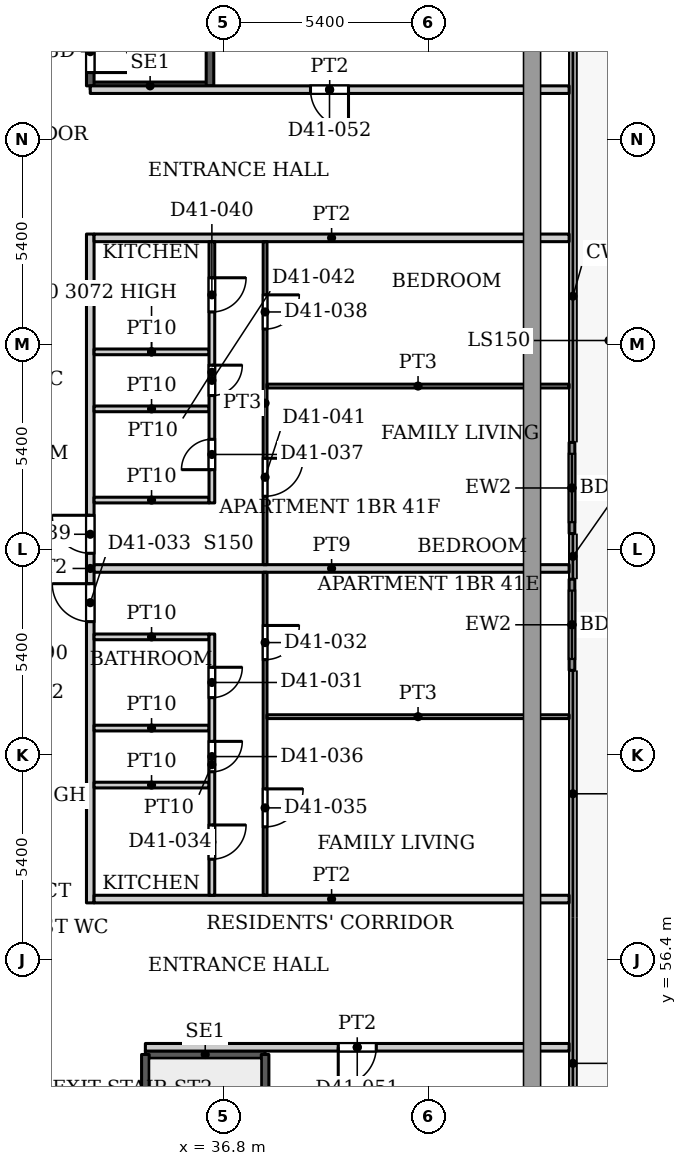
"""IFC4 building model, lengths in metres.
Left out: names, types, materials, properties, quantities, classifications, styles, units other than length and angle.
Written with IfcOpenShell. Run it as: python <this file> out.ifc"""

import sys

from ifc_helpers import new_model, si_unit, direction, frame, frame_2d, origin, place, context, subcontext, project, spatial, rectangle, extrude, source, transform, mapped, element, fill, save


model = new_model("IFC4")
c1 = context("Model", 3, precision=1e-05, world=origin(), true_north=direction((0.0, 1.0)))
c2 = subcontext(c1, "Body", "Model", "MODEL_VIEW")
j1 = project(units=[si_unit("LENGTHUNIT", "METRE"), si_unit("PLANEANGLEUNIT", "RADIAN")], contexts=[c1])
p1 = place(None, origin())
s1 = spatial("IfcSite", under=j1, at=p1, CompositionType="ELEMENT")
p2 = place(p1, origin())
s2 = spatial("IfcBuilding", under=s1, at=p2, CompositionType="ELEMENT")
p3 = place(p2, frame((0.0, 0.0, 176.0)))
s3 = spatial("IfcBuildingStorey", under=s2, at=p3, CompositionType="ELEMENT", Elevation=176.0)
p4 = place(p3, frame((45.975, 70.018, 0.0), z_axis=(0.0, 0.0, 1.0), x_axis=(0.0, -1.0, 0.0)))
e1 = element("IfcWall", 1, at=p4, inside=s3, PredefinedType="SOLIDWALL", context=c2, shape_type="SweptSolid", body=[
    extrude(rectangle(XDim=2.4, YDim=0.15, at=frame_2d((1.2, 0.0))), origin(), (0.0, 0.0, 1.0), 3.75),
])
p5 = place(p4, frame((0.3, 0.0, 0.0)))
e2 = element("IfcOpeningElement", 2, at=p5, cuts=e1, PredefinedType="OPENING", context=c2, shape_type="SweptSolid", body=[
    extrude(rectangle(XDim=1.8, YDim=2.4, at=frame_2d((0.9, 1.2))), frame((0.0, 0.085, 0.0), z_axis=(0.0, -1.0, 0.0), x_axis=(1.0, 0.0, 0.0)), (0.0, 0.0, 1.0), 0.17),
])
p6 = place(p3, frame((45.975, 66.418, 0.0), z_axis=(0.0, 0.0, 1.0), x_axis=(0.0, -1.0, 0.0)))
e3 = element("IfcWall", 3, at=p6, inside=s3, PredefinedType="SOLIDWALL", context=c2, shape_type="SweptSolid", body=[
    extrude(rectangle(XDim=2.4, YDim=0.15, at=frame_2d((1.2, 0.0))), origin(), (0.0, 0.0, 1.0), 3.75),
])
p7 = place(p6, frame((0.3, 0.0, 0.0)))
e4 = element("IfcOpeningElement", 4, at=p7, cuts=e3, PredefinedType="OPENING", context=c2, shape_type="SweptSolid", body=[
    extrude(rectangle(XDim=1.8, YDim=2.4, at=frame_2d((0.9, 1.2))), frame((0.0, 0.085, 0.0), z_axis=(0.0, -1.0, 0.0), x_axis=(1.0, 0.0, 0.0)), (0.0, 0.0, 1.0), 0.17),
])
p8 = place(p3, frame((34.75, 53.91, 0.0), z_axis=(0.0, 0.0, 1.0), x_axis=(1.0, 0.0, 0.0)))
e5 = element("IfcWall", 5, at=p8, inside=s3, PredefinedType="SHEAR", context=c2, shape_type="SweptSolid", body=[
    extrude(rectangle(XDim=3.15, YDim=0.2, at=frame_2d((1.575, 0.0))), origin(), (0.0, 0.0, 1.0), 3.9),
])
p9 = place(p3, frame((34.75, 47.5, 0.0), z_axis=(0.0, 0.0, 1.0), x_axis=(0.0, 1.0, 0.0)))
e6 = element("IfcWall", 6, at=p9, inside=s3, PredefinedType="SHEAR", context=c2, shape_type="SweptSolid", body=[
    extrude(rectangle(XDim=6.41, YDim=0.2, at=frame_2d((3.205, 0.0))), origin(), (0.0, 0.0, 1.0), 3.9),
])
p10 = place(p3, frame((37.9, 44.75, 0.0), z_axis=(0.0, 0.0, 1.0), x_axis=(0.0, 1.0, 0.0)))
e7 = element("IfcWall", 7, at=p10, inside=s3, PredefinedType="SHEAR", context=c2, shape_type="SweptSolid", body=[
    extrude(rectangle(XDim=9.16, YDim=0.2, at=frame_2d((4.58, 0.0))), origin(), (0.0, 0.0, 1.0), 3.9),
])
p11 = place(p3, frame((33.3, 79.4, 0.0), z_axis=(0.0, 0.0, 1.0), x_axis=(1.0, 0.0, 0.0)))
e8 = element("IfcWall", 8, at=p11, inside=s3, PredefinedType="SHEAR", context=c2, shape_type="SweptSolid", body=[
    extrude(rectangle(XDim=3.15, YDim=0.2, at=frame_2d((1.575, 0.0))), origin(), (0.0, 0.0, 1.0), 3.9),
])
p12 = place(p3, frame((33.3, 79.4, 0.0), z_axis=(0.0, 0.0, 1.0), x_axis=(0.0, 1.0, 0.0)))
e9 = element("IfcWall", 9, at=p12, inside=s3, PredefinedType="SHEAR", context=c2, shape_type="SweptSolid", body=[
    extrude(rectangle(XDim=9.16, YDim=0.2, at=frame_2d((4.58, 0.0))), origin(), (0.0, 0.0, 1.0), 3.9),
])
p13 = place(p12, frame((0.35, 0.0, 0.0)))
e10 = element("IfcOpeningElement", 10, at=p13, cuts=e9, PredefinedType="OPENING", context=c2, shape_type="SweptSolid", body=[
    extrude(rectangle(XDim=1.1, YDim=2.2, at=frame_2d((0.55, 1.1))), frame((0.0, 0.11, 0.0), z_axis=(0.0, -1.0, 0.0), x_axis=(1.0, 0.0, 0.0)), (0.0, 0.0, 1.0), 0.22),
])
p14 = place(p3, frame((36.45, 79.4, 0.0), z_axis=(0.0, 0.0, 1.0), x_axis=(0.0, 1.0, 0.0)))
e11 = element("IfcWall", 11, at=p14, inside=s3, PredefinedType="SHEAR", context=c2, shape_type="SweptSolid", body=[
    extrude(rectangle(XDim=9.16, YDim=0.2, at=frame_2d((4.58, 0.0))), origin(), (0.0, 0.0, 1.0), 3.9),
])
p15 = place(p3, frame((33.3, 57.9, 0.0), z_axis=(0.0, 0.0, 1.0), x_axis=(0.0, 1.0, 0.0)))
e12 = element("IfcWall", 12, at=p15, inside=s3, PredefinedType="PARTITIONING", context=c2, shape_type="SweptSolid", body=[
    extrude(rectangle(XDim=17.6, YDim=0.2, at=frame_2d((8.8, 0.0))), origin(), (0.0, 0.0, 1.0), 3.6),
])
p16 = place(p15, frame((7.4, 0.0, 0.0)))
e13 = element("IfcOpeningElement", 13, at=p16, cuts=e12, PredefinedType="OPENING", context=c2, shape_type="SweptSolid", body=[
    extrude(rectangle(XDim=1.0, YDim=2.1, at=frame_2d((0.5, 1.05))), frame((0.0, 0.11, 0.0), z_axis=(0.0, -1.0, 0.0), x_axis=(1.0, 0.0, 0.0)), (0.0, 0.0, 1.0), 0.22),
])
p17 = place(p15, frame((9.2, 0.0, 0.0)))
e14 = element("IfcOpeningElement", 14, at=p17, cuts=e12, PredefinedType="OPENING", context=c2, shape_type="SweptSolid", body=[
    extrude(rectangle(XDim=1.0, YDim=2.1, at=frame_2d((0.5, 1.05))), frame((0.0, 0.11, 0.0), z_axis=(0.0, -1.0, 0.0), x_axis=(1.0, 0.0, 0.0)), (0.0, 0.0, 1.0), 0.22),
])
p18 = place(p3, frame((33.3, 79.3, 0.0), z_axis=(0.0, 0.0, 1.0), x_axis=(1.0, 0.0, 0.0)))
e15 = element("IfcWall", 15, at=p18, inside=s3, PredefinedType="PARTITIONING", context=c2, shape_type="SweptSolid", body=[
    extrude(rectangle(XDim=12.6, YDim=0.2, at=frame_2d((6.3, 0.0))), origin(), (0.0, 0.0, 1.0), 3.6),
])
p19 = place(p18, frame((5.795, 0.0, 0.0)))
e16 = element("IfcOpeningElement", 16, at=p19, cuts=e15, PredefinedType="OPENING", context=c2, shape_type="SweptSolid", body=[
    extrude(rectangle(XDim=1.0, YDim=2.1, at=frame_2d((0.5, 1.05))), frame((0.0, 0.11, 0.0), z_axis=(0.0, -1.0, 0.0), x_axis=(1.0, 0.0, 0.0)), (0.0, 0.0, 1.0), 0.22),
])
p20 = place(p3, frame((33.4, 58.0, 0.0), z_axis=(0.0, 0.0, 1.0), x_axis=(1.0, 0.0, 0.0)))
e17 = element("IfcWall", 17, at=p20, inside=s3, PredefinedType="PARTITIONING", context=c2, shape_type="SweptSolid", body=[
    extrude(rectangle(XDim=12.5, YDim=0.2, at=frame_2d((6.25, 0.0))), origin(), (0.0, 0.0, 1.0), 3.6),
])
for number, where, z_axis, x_axis in (
    (18, (33.4, 61.0, 0.0), (0.0, 0.0, 1.0), (1.0, 0.0, 0.0)),
    (19, (33.4, 62.5, 0.0), (0.0, 0.0, 1.0), (1.0, 0.0, 0.0)),
    (20, (33.4, 64.9, 0.0), (0.0, 0.0, 1.0), (1.0, 0.0, 0.0)),
):
    element("IfcWall", number, at=place(p3, frame(where, z_axis=z_axis, x_axis=x_axis)), inside=s3, PredefinedType="PARTITIONING", context=c2, shape_type="SweptSolid", body=[
        extrude(rectangle(XDim=3.025, YDim=0.15, at=frame_2d((1.513, 0.0))), origin(), (0.0, 0.0, 1.0), 3.6),
    ])
p21 = place(p3, frame((33.4, 66.7, 0.0), z_axis=(0.0, 0.0, 1.0), x_axis=(1.0, 0.0, 0.0)))
e21 = element("IfcWall", 21, at=p21, inside=s3, PredefinedType="PARTITIONING", context=c2, shape_type="SweptSolid", body=[
    extrude(rectangle(XDim=12.5, YDim=0.2, at=frame_2d((6.25, 0.0))), origin(), (0.0, 0.0, 1.0), 3.6),
])
for number, where, z_axis, x_axis in (
    (22, (33.4, 68.5, 0.0), (0.0, 0.0, 1.0), (1.0, 0.0, 0.0)),
    (23, (33.4, 70.9, 0.0), (0.0, 0.0, 1.0), (1.0, 0.0, 0.0)),
):
    element("IfcWall", number, at=place(p3, frame(where, z_axis=z_axis, x_axis=x_axis)), inside=s3, PredefinedType="PARTITIONING", context=c2, shape_type="SweptSolid", body=[
        extrude(rectangle(XDim=3.025, YDim=0.15, at=frame_2d((1.513, 0.0))), origin(), (0.0, 0.0, 1.0), 3.6),
    ])
p22 = place(p3, frame((33.4, 72.4, 0.0), z_axis=(0.0, 0.0, 1.0), x_axis=(1.0, 0.0, 0.0)))
e24 = element("IfcWall", 24, at=p22, inside=s3, PredefinedType="PARTITIONING", context=c2, shape_type="SweptSolid", body=[
    extrude(rectangle(XDim=3.025, YDim=0.15, at=frame_2d((1.513, 0.0))), origin(), (0.0, 0.0, 1.0), 3.072),
])
p23 = place(p3, frame((33.4, 75.4, 0.0), z_axis=(0.0, 0.0, 1.0), x_axis=(1.0, 0.0, 0.0)))
e25 = element("IfcWall", 25, at=p23, inside=s3, PredefinedType="PARTITIONING", context=c2, shape_type="SweptSolid", body=[
    extrude(rectangle(XDim=12.5, YDim=0.2, at=frame_2d((6.25, 0.0))), origin(), (0.0, 0.0, 1.0), 3.6),
])
p24 = place(p3, frame((34.75, 54.1, 0.0), z_axis=(0.0, 0.0, 1.0), x_axis=(1.0, 0.0, 0.0)))
e26 = element("IfcWall", 26, at=p24, inside=s3, PredefinedType="PARTITIONING", context=c2, shape_type="SweptSolid", body=[
    extrude(rectangle(XDim=11.15, YDim=0.2, at=frame_2d((5.575, 0.0))), origin(), (0.0, 0.0, 1.0), 3.6),
])
p25 = place(p24, frame((5.075, 0.0, 0.0)))
e27 = element("IfcOpeningElement", 27, at=p25, cuts=e26, PredefinedType="OPENING", context=c2, shape_type="SweptSolid", body=[
    extrude(rectangle(XDim=1.0, YDim=2.1, at=frame_2d((0.5, 1.05))), frame((0.0, 0.11, 0.0), z_axis=(0.0, -1.0, 0.0), x_axis=(1.0, 0.0, 0.0)), (0.0, 0.0, 1.0), 0.22),
])
p26 = place(p3, frame((36.5, 58.1, 0.0), z_axis=(0.0, 0.0, 1.0), x_axis=(0.0, 1.0, 0.0)))
e28 = element("IfcWall", 28, at=p26, inside=s3, PredefinedType="PARTITIONING", context=c2, shape_type="SweptSolid", body=[
    extrude(rectangle(XDim=6.875, YDim=0.15, at=frame_2d((3.438, 0.0))), origin(), (0.0, 0.0, 1.0), 3.6),
])
p27 = place(p26, frame((5.2, 0.0, 0.0)))
e29 = element("IfcOpeningElement", 29, at=p27, cuts=e28, PredefinedType="OPENING", context=c2, shape_type="SweptSolid", body=[
    extrude(rectangle(XDim=0.8, YDim=2.1, at=frame_2d((0.4, 1.05))), frame((0.0, 0.085, 0.0), z_axis=(0.0, -1.0, 0.0), x_axis=(1.0, 0.0, 0.0)), (0.0, 0.0, 1.0), 0.17),
])
p28 = place(p26, frame((0.95, 0.0, 0.0)))
e30 = element("IfcOpeningElement", 30, at=p28, cuts=e28, PredefinedType="OPENING", context=c2, shape_type="SweptSolid", body=[
    extrude(rectangle(XDim=0.9, YDim=2.1, at=frame_2d((0.45, 1.05))), frame((0.0, 0.085, 0.0), z_axis=(0.0, -1.0, 0.0), x_axis=(1.0, 0.0, 0.0)), (0.0, 0.0, 1.0), 0.17),
])
p29 = place(p26, frame((3.25, 0.0, 0.0)))
e31 = element("IfcOpeningElement", 31, at=p29, cuts=e28, PredefinedType="OPENING", context=c2, shape_type="SweptSolid", body=[
    extrude(rectangle(XDim=0.8, YDim=2.1, at=frame_2d((0.4, 1.05))), frame((0.0, 0.085, 0.0), z_axis=(0.0, -1.0, 0.0), x_axis=(1.0, 0.0, 0.0)), (0.0, 0.0, 1.0), 0.17),
])
p30 = place(p3, frame((36.5, 68.425, 0.0), z_axis=(0.0, 0.0, 1.0), x_axis=(0.0, 1.0, 0.0)))
e32 = element("IfcWall", 32, at=p30, inside=s3, PredefinedType="PARTITIONING", context=c2, shape_type="SweptSolid", body=[
    extrude(rectangle(XDim=6.875, YDim=0.15, at=frame_2d((3.438, 0.0))), origin(), (0.0, 0.0, 1.0), 3.6),
])
p31 = place(p30, frame((0.875, 0.0, 0.0)))
e33 = element("IfcOpeningElement", 33, at=p31, cuts=e32, PredefinedType="OPENING", context=c2, shape_type="SweptSolid", body=[
    extrude(rectangle(XDim=0.8, YDim=2.1, at=frame_2d((0.4, 1.05))), frame((0.0, 0.085, 0.0), z_axis=(0.0, -1.0, 0.0), x_axis=(1.0, 0.0, 0.0)), (0.0, 0.0, 1.0), 0.17),
])
p32 = place(p30, frame((5.025, 0.0, 0.0)))
e34 = element("IfcOpeningElement", 34, at=p32, cuts=e32, PredefinedType="OPENING", context=c2, shape_type="SweptSolid", body=[
    extrude(rectangle(XDim=0.9, YDim=2.1, at=frame_2d((0.45, 1.05))), frame((0.0, 0.085, 0.0), z_axis=(0.0, -1.0, 0.0), x_axis=(1.0, 0.0, 0.0)), (0.0, 0.0, 1.0), 0.17),
])
p33 = place(p30, frame((2.825, 0.0, 0.0)))
e35 = element("IfcOpeningElement", 35, at=p33, cuts=e32, PredefinedType="OPENING", context=c2, shape_type="SweptSolid", body=[
    extrude(rectangle(XDim=0.8, YDim=2.1, at=frame_2d((0.4, 1.05))), frame((0.0, 0.085, 0.0), z_axis=(0.0, -1.0, 0.0), x_axis=(1.0, 0.0, 0.0)), (0.0, 0.0, 1.0), 0.17),
])
p34 = place(p3, frame((37.9, 58.1, 0.0), z_axis=(0.0, 0.0, 1.0), x_axis=(0.0, 1.0, 0.0)))
e36 = element("IfcWall", 36, at=p34, inside=s3, PredefinedType="PARTITIONING", context=c2, shape_type="SweptSolid", body=[
    extrude(rectangle(XDim=8.5, YDim=0.1, at=frame_2d((4.25, 0.0))), origin(), (0.0, 0.0, 1.0), 3.6),
])
p35 = place(p34, frame((6.2, 0.0, 0.0)))
e37 = element("IfcOpeningElement", 37, at=p35, cuts=e36, PredefinedType="OPENING", context=c2, shape_type="SweptSolid", body=[
    extrude(rectangle(XDim=0.9, YDim=2.1, at=frame_2d((0.45, 1.05))), frame((0.0, 0.06, 0.0), z_axis=(0.0, -1.0, 0.0), x_axis=(1.0, 0.0, 0.0)), (0.0, 0.0, 1.0), 0.12),
])
p36 = place(p34, frame((1.8, 0.0, 0.0)))
e38 = element("IfcOpeningElement", 38, at=p36, cuts=e36, PredefinedType="OPENING", context=c2, shape_type="SweptSolid", body=[
    extrude(rectangle(XDim=1.0, YDim=2.1, at=frame_2d((0.5, 1.05))), frame((0.0, 0.06, 0.0), z_axis=(0.0, -1.0, 0.0), x_axis=(1.0, 0.0, 0.0)), (0.0, 0.0, 1.0), 0.12),
])
p37 = place(p3, frame((37.9, 66.8, 0.0), z_axis=(0.0, 0.0, 1.0), x_axis=(0.0, 1.0, 0.0)))
e39 = element("IfcWall", 39, at=p37, inside=s3, PredefinedType="PARTITIONING", context=c2, shape_type="SweptSolid", body=[
    extrude(rectangle(XDim=8.5, YDim=0.1, at=frame_2d((4.25, 0.0))), origin(), (0.0, 0.0, 1.0), 3.6),
])
p38 = place(p37, frame((6.2, 0.0, 0.0)))
e40 = element("IfcOpeningElement", 40, at=p38, cuts=e39, PredefinedType="OPENING", context=c2, shape_type="SweptSolid", body=[
    extrude(rectangle(XDim=0.9, YDim=2.1, at=frame_2d((0.45, 1.05))), frame((0.0, 0.06, 0.0), z_axis=(0.0, -1.0, 0.0), x_axis=(1.0, 0.0, 0.0)), (0.0, 0.0, 1.0), 0.12),
])
p39 = place(p37, frame((1.8, 0.0, 0.0)))
e41 = element("IfcOpeningElement", 41, at=p39, cuts=e39, PredefinedType="OPENING", context=c2, shape_type="SweptSolid", body=[
    extrude(rectangle(XDim=1.0, YDim=2.1, at=frame_2d((0.5, 1.05))), frame((0.0, 0.06, 0.0), z_axis=(0.0, -1.0, 0.0), x_axis=(1.0, 0.0, 0.0)), (0.0, 0.0, 1.0), 0.12),
])
for number, where, z_axis, x_axis in (
    (42, (37.95, 62.8, 0.0), (0.0, 0.0, 1.0), (1.0, 0.0, 0.0)),
    (43, (37.95, 71.5, 0.0), (0.0, 0.0, 1.0), (1.0, 0.0, 0.0)),
):
    element("IfcWall", number, at=place(p3, frame(where, z_axis=z_axis, x_axis=x_axis)), inside=s3, PredefinedType="PARTITIONING", context=c2, shape_type="SweptSolid", body=[
        extrude(rectangle(XDim=7.95, YDim=0.1, at=frame_2d((3.975, 0.0))), origin(), (0.0, 0.0, 1.0), 3.6),
    ])
m1 = source(origin(), c2, "Body", "SweptSolid", [
    extrude(rectangle(XDim=1.8, YDim=2.4, at=frame_2d((0.9, 1.2))), frame((0.0, 0.025, 0.0), z_axis=(0.0, -1.0, 0.0), x_axis=(1.0, 0.0, 0.0)), (0.0, 0.0, 1.0), 0.05),
])
p40 = place(p5, origin())
e44 = element("IfcDoor", 44, at=p40, inside=s3, OperationType="SLIDING_TO_LEFT", PredefinedType="DOOR", context=c2, shape_type="MappedRepresentation", body=[
    mapped(m1, transform((0.0, 0.0, 0.0), x_axis=(1.0, 0.0, 0.0), y_axis=(0.0, 1.0, 0.0), z_axis=(0.0, 0.0, 1.0), scale=1.0)),
])
fill(e2, e44)
p41 = place(p7, origin())
e45 = element("IfcDoor", 45, at=p41, inside=s3, OperationType="SLIDING_TO_LEFT", PredefinedType="DOOR", context=c2, shape_type="MappedRepresentation", body=[
    mapped(m1, transform((0.0, 0.0, 0.0), x_axis=(1.0, 0.0, 0.0), y_axis=(0.0, 1.0, 0.0), z_axis=(0.0, 0.0, 1.0), scale=1.0)),
])
fill(e4, e45)
m2 = source(origin(), c2, "Body", "SweptSolid", [
    extrude(rectangle(XDim=1.1, YDim=2.2, at=frame_2d((0.55, 1.1))), frame((0.0, 0.025, 0.0), z_axis=(0.0, -1.0, 0.0), x_axis=(1.0, 0.0, 0.0)), (0.0, 0.0, 1.0), 0.05),
])
p42 = place(p13, origin())
e46 = element("IfcDoor", 46, at=p42, inside=s3, OperationType="SINGLE_SWING_RIGHT", PredefinedType="DOOR", context=c2, shape_type="MappedRepresentation", body=[
    mapped(m2, transform((0.0, 0.0, 0.0), x_axis=(1.0, 0.0, 0.0), y_axis=(0.0, 1.0, 0.0), z_axis=(0.0, 0.0, 1.0), scale=1.0)),
])
fill(e10, e46)
m3 = source(origin(), c2, "Body", "SweptSolid", [
    extrude(rectangle(XDim=0.8, YDim=2.1, at=frame_2d((0.4, 1.05))), frame((0.0, 0.025, 0.0), z_axis=(0.0, -1.0, 0.0), x_axis=(1.0, 0.0, 0.0)), (0.0, 0.0, 1.0), 0.05),
])
p43 = place(p27, origin())
e47 = element("IfcDoor", 47, at=p43, inside=s3, OperationType="SINGLE_SWING_RIGHT", PredefinedType="DOOR", context=c2, shape_type="MappedRepresentation", body=[
    mapped(m3, transform((0.0, 0.0, 0.0), x_axis=(1.0, 0.0, 0.0), y_axis=(0.0, 1.0, 0.0), z_axis=(0.0, 0.0, 1.0), scale=1.0)),
])
fill(e29, e47)
m4 = source(origin(), c2, "Body", "SweptSolid", [
    extrude(rectangle(XDim=0.9, YDim=2.1, at=frame_2d((0.45, 1.05))), frame((0.0, 0.025, 0.0), z_axis=(0.0, -1.0, 0.0), x_axis=(1.0, 0.0, 0.0)), (0.0, 0.0, 1.0), 0.05),
])
p44 = place(p35, origin())
e48 = element("IfcDoor", 48, at=p44, inside=s3, OperationType="SINGLE_SWING_RIGHT", PredefinedType="DOOR", context=c2, shape_type="MappedRepresentation", body=[
    mapped(m4, transform((0.0, 0.0, 0.0), x_axis=(1.0, 0.0, 0.0), y_axis=(0.0, 1.0, 0.0), z_axis=(0.0, 0.0, 1.0), scale=1.0)),
])
fill(e37, e48)
m5 = source(origin(), c2, "Body", "SweptSolid", [
    extrude(rectangle(XDim=1.0, YDim=2.1, at=frame_2d((0.5, 1.05))), frame((0.0, 0.025, 0.0), z_axis=(0.0, -1.0, 0.0), x_axis=(1.0, 0.0, 0.0)), (0.0, 0.0, 1.0), 0.05),
])
p45 = place(p16, origin())
e49 = element("IfcDoor", 49, at=p45, inside=s3, OperationType="SINGLE_SWING_LEFT", PredefinedType="DOOR", context=c2, shape_type="MappedRepresentation", body=[
    mapped(m5, transform((0.0, 0.0, 0.0), x_axis=(1.0, 0.0, 0.0), y_axis=(0.0, 1.0, 0.0), z_axis=(0.0, 0.0, 1.0), scale=1.0)),
])
fill(e13, e49)
p46 = place(p28, origin())
e50 = element("IfcDoor", 50, at=p46, inside=s3, OperationType="SINGLE_SWING_RIGHT", PredefinedType="DOOR", context=c2, shape_type="MappedRepresentation", body=[
    mapped(m4, transform((0.0, 0.0, 0.0), x_axis=(1.0, 0.0, 0.0), y_axis=(0.0, 1.0, 0.0), z_axis=(0.0, 0.0, 1.0), scale=1.0)),
])
fill(e30, e50)
m6 = source(origin(), c2, "Body", "SweptSolid", [
    extrude(rectangle(XDim=1.0, YDim=2.1, at=frame_2d((0.5, 1.05))), frame((0.0, 0.025, 0.0), z_axis=(0.0, -1.0, 0.0), x_axis=(1.0, 0.0, 0.0)), (0.0, 0.0, 1.0), 0.05),
])
p47 = place(p36, origin())
e51 = element("IfcDoor", 51, at=p47, inside=s3, OperationType="SINGLE_SWING_RIGHT", PredefinedType="DOOR", context=c2, shape_type="MappedRepresentation", body=[
    mapped(m6, transform((0.0, 0.0, 0.0), x_axis=(1.0, 0.0, 0.0), y_axis=(0.0, 1.0, 0.0), z_axis=(0.0, 0.0, 1.0), scale=1.0)),
])
fill(e38, e51)
p48 = place(p29, origin())
e52 = element("IfcDoor", 52, at=p48, inside=s3, OperationType="SINGLE_SWING_RIGHT", PredefinedType="DOOR", context=c2, shape_type="MappedRepresentation", body=[
    mapped(m3, transform((0.0, 0.0, 0.0), x_axis=(1.0, 0.0, 0.0), y_axis=(0.0, 1.0, 0.0), z_axis=(0.0, 0.0, 1.0), scale=1.0)),
])
fill(e31, e52)
p49 = place(p31, origin())
e53 = element("IfcDoor", 53, at=p49, inside=s3, OperationType="SINGLE_SWING_LEFT", PredefinedType="DOOR", context=c2, shape_type="MappedRepresentation", body=[
    mapped(m3, transform((0.0, 0.0, 0.0), x_axis=(1.0, 0.0, 0.0), y_axis=(0.0, 1.0, 0.0), z_axis=(0.0, 0.0, 1.0), scale=1.0)),
])
fill(e33, e53)
p50 = place(p38, origin())
e54 = element("IfcDoor", 54, at=p50, inside=s3, OperationType="SINGLE_SWING_RIGHT", PredefinedType="DOOR", context=c2, shape_type="MappedRepresentation", body=[
    mapped(m4, transform((0.0, 0.0, 0.0), x_axis=(1.0, 0.0, 0.0), y_axis=(0.0, 1.0, 0.0), z_axis=(0.0, 0.0, 1.0), scale=1.0)),
])
fill(e40, e54)
p51 = place(p17, origin())
e55 = element("IfcDoor", 55, at=p51, inside=s3, OperationType="SINGLE_SWING_LEFT", PredefinedType="DOOR", context=c2, shape_type="MappedRepresentation", body=[
    mapped(m5, transform((0.0, 0.0, 0.0), x_axis=(1.0, 0.0, 0.0), y_axis=(0.0, 1.0, 0.0), z_axis=(0.0, 0.0, 1.0), scale=1.0)),
])
fill(e14, e55)
p52 = place(p32, origin())
e56 = element("IfcDoor", 56, at=p52, inside=s3, OperationType="SINGLE_SWING_RIGHT", PredefinedType="DOOR", context=c2, shape_type="MappedRepresentation", body=[
    mapped(m4, transform((0.0, 0.0, 0.0), x_axis=(1.0, 0.0, 0.0), y_axis=(0.0, 1.0, 0.0), z_axis=(0.0, 0.0, 1.0), scale=1.0)),
])
fill(e34, e56)
p53 = place(p39, origin())
e57 = element("IfcDoor", 57, at=p53, inside=s3, OperationType="SINGLE_SWING_RIGHT", PredefinedType="DOOR", context=c2, shape_type="MappedRepresentation", body=[
    mapped(m6, transform((0.0, 0.0, 0.0), x_axis=(1.0, 0.0, 0.0), y_axis=(0.0, 1.0, 0.0), z_axis=(0.0, 0.0, 1.0), scale=1.0)),
])
fill(e41, e57)
p54 = place(p33, origin())
e58 = element("IfcDoor", 58, at=p54, inside=s3, OperationType="SINGLE_SWING_RIGHT", PredefinedType="DOOR", context=c2, shape_type="MappedRepresentation", body=[
    mapped(m3, transform((0.0, 0.0, 0.0), x_axis=(1.0, 0.0, 0.0), y_axis=(0.0, 1.0, 0.0), z_axis=(0.0, 0.0, 1.0), scale=1.0)),
])
fill(e35, e58)
m7 = source(origin(), c2, "Body", "SweptSolid", [
    extrude(rectangle(XDim=1.0, YDim=2.1, at=frame_2d((0.5, 1.05))), frame((0.0, 0.025, 0.0), z_axis=(0.0, -1.0, 0.0), x_axis=(1.0, 0.0, 0.0)), (0.0, 0.0, 1.0), 0.05),
])
p55 = place(p25, origin())
e59 = element("IfcDoor", 59, at=p55, inside=s3, OperationType="SINGLE_SWING_RIGHT", PredefinedType="DOOR", context=c2, shape_type="MappedRepresentation", body=[
    mapped(m7, transform((0.0, 0.0, 0.0), x_axis=(1.0, 0.0, 0.0), y_axis=(0.0, 1.0, 0.0), z_axis=(0.0, 0.0, 1.0), scale=1.0)),
])
fill(e27, e59)
p56 = place(p19, origin())
e60 = element("IfcDoor", 60, at=p56, inside=s3, OperationType="SINGLE_SWING_RIGHT", PredefinedType="DOOR", context=c2, shape_type="MappedRepresentation", body=[
    mapped(m7, transform((0.0, 0.0, 0.0), x_axis=(1.0, 0.0, 0.0), y_axis=(0.0, 1.0, 0.0), z_axis=(0.0, 0.0, 1.0), scale=1.0)),
])
fill(e16, e60)
save(model, sys.argv[1])
